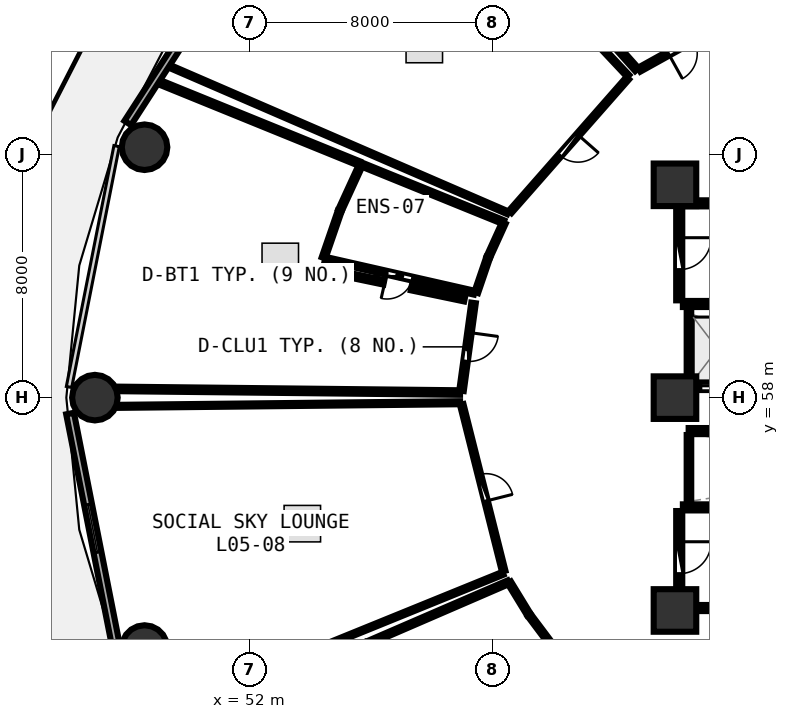
"""IFC4 building model, lengths in metres.
Left out: names, types, materials, properties, quantities, classifications, styles, units other than length and angle.
Written with IfcOpenShell. Run it as: python <this file> out.ifc"""

import sys

from ifc_helpers import new_model, si_unit, direction, frame, frame_2d, origin, origin_2d, place, context, subcontext, project, spatial, rectangle, circle, extrude, element, fill, save


model = new_model("IFC4")
c1 = context("Model", 3, precision=1e-05, world=origin(), true_north=direction((0.0, 1.0)))
c2 = subcontext(c1, "Body", "Model", "MODEL_VIEW")
j1 = project(units=[si_unit("LENGTHUNIT", "METRE"), si_unit("PLANEANGLEUNIT", "RADIAN")], contexts=[c1])
p1 = place(None, origin())
s1 = spatial("IfcSite", under=j1, at=p1, CompositionType="ELEMENT")
p2 = place(p1, origin())
s2 = spatial("IfcBuilding", under=s1, at=p2, CompositionType="ELEMENT")
p3 = place(p2, frame((0.0, 0.0, 22.5)))
s3 = spatial("IfcBuildingStorey", under=s2, at=p3, CompositionType="ELEMENT", Elevation=22.5)
for number, where, z_axis, x_axis in (
    (1, (66.0, 51.0, 0.0), (0.0, 0.0, 1.0), (1.0, 0.0, 0.0)),
    (2, (66.0, 65.0, 0.0), (0.0, 0.0, 1.0), (1.0, 0.0, 0.0)),
    (3, (66.0, 58.0, 0.0), (0.0, 0.0, 1.0), (1.0, 0.0, 0.0)),
):
    element("IfcColumn", number, at=place(p3, frame(where, z_axis=z_axis, x_axis=x_axis)), inside=s3, PredefinedType="PILASTER", context=c2, shape_type="SweptSolid", body=[
        extrude(rectangle(XDim=1.4, YDim=1.4, at=origin_2d()), origin(), (0.0, 0.0, 1.0), 3.75),
    ])
for number, where, z_axis, x_axis in (
    (4, (48.553, 66.236, 0.0), (0.0, 0.0, 1.0), (1.0, 0.0, 0.0)),
    (5, (46.92, 58.0, 0.0), (0.0, 0.0, 1.0), (1.0, 0.0, 0.0)),
    (6, (48.553, 49.764, 0.0), (0.0, 0.0, 1.0), (1.0, 0.0, 0.0)),
):
    element("IfcColumn", number, at=place(p3, frame(where, z_axis=z_axis, x_axis=x_axis)), inside=s3, PredefinedType="COLUMN", context=c2, shape_type="SweptSolid", body=[
        extrude(circle(Radius=0.75, at=origin_2d()), origin(), (0.0, 0.0, 1.0), 3.75),
    ])
p4 = place(p3, frame((52.311, 73.698, 0.0), z_axis=(0.0, 0.0, 1.0), x_axis=(-0.543005114258, -0.839729388488, 0.0)))
e7 = element("IfcWall", 7, at=p4, inside=s3, PredefinedType="SOLIDWALL", context=c2, shape_type="SweptSolid", body=[
    extrude(rectangle(XDim=7.938, YDim=0.26, at=frame_2d((3.969, 0.0))), origin(), (0.0, 0.0, 1.0), 3.475),
])
p5 = place(p4, frame((3.494, 0.0, 0.0)))
e8 = element("IfcOpeningElement", 8, at=p5, cuts=e7, PredefinedType="OPENING", context=c2, shape_type="SweptSolid", body=[
    extrude(rectangle(XDim=0.95, YDim=2.1, at=frame_2d((0.475, 1.05))), frame((0.0, 0.14, 0.0), z_axis=(0.0, -1.0, 0.0), x_axis=(1.0, 0.0, 0.0)), (0.0, 0.0, 1.0), 0.28),
])
p6 = place(p4, frame((1.914, 0.0, 0.85)))
e9 = element("IfcOpeningElement", 9, at=p6, cuts=e7, PredefinedType="OPENING", context=c2, shape_type="SweptSolid", body=[
    extrude(rectangle(XDim=1.2, YDim=1.45, at=frame_2d((0.6, 0.725))), frame((0.0, 0.14, 0.0), z_axis=(0.0, -1.0, 0.0), x_axis=(1.0, 0.0, 0.0)), (0.0, 0.0, 1.0), 0.28),
])
p7 = place(p3, frame((46.104, 57.477, 0.0), z_axis=(0.0, 0.0, 1.0), x_axis=(0.193726159581, -0.98105564322, 0.0)))
e10 = element("IfcWall", 10, at=p7, inside=s3, PredefinedType="SOLIDWALL", context=c2, shape_type="SweptSolid", body=[
    extrude(rectangle(XDim=7.703, YDim=0.26, at=frame_2d((3.851, 0.0))), origin(), (0.0, 0.0, 1.0), 3.475),
])
p8 = place(p7, frame((3.051, 0.0, 0.85)))
e11 = element("IfcOpeningElement", 11, at=p8, cuts=e10, PredefinedType="OPENING", context=c2, shape_type="SweptSolid", body=[
    extrude(rectangle(XDim=1.6, YDim=1.45, at=frame_2d((0.8, 0.725))), frame((0.0, 0.14, 0.0), z_axis=(0.0, -1.0, 0.0), x_axis=(1.0, 0.0, 0.0)), (0.0, 0.0, 1.0), 0.28),
])
for number, where, z_axis, x_axis in (
    (12, (66.26, 61.08, 0.0), (0.0, 0.0, 1.0), (1.0, 0.0, 0.0)),
    (13, (73.42, 64.39, 0.0), (0.0, 0.0, 1.0), (-1.0, 0.0, 0.0)),
):
    element("IfcWall", number, at=place(p3, frame(where, z_axis=z_axis, x_axis=x_axis)), inside=s3, PredefinedType="SHEAR", context=c2, shape_type="SweptSolid", body=[
        extrude(rectangle(XDim=7.16, YDim=0.2, at=frame_2d((3.58, 0.0))), origin(), (0.0, 0.0, 1.0), 3.49),
    ])
p9 = place(p3, frame((66.14, 64.27, 0.0), z_axis=(0.0, 0.0, 1.0), x_axis=(0.0, -1.0, 0.0)))
e14 = element("IfcWall", 14, at=p9, inside=s3, PredefinedType="SHEAR", context=c2, shape_type="SweptSolid", body=[
    extrude(rectangle(XDim=3.07, YDim=0.2, at=frame_2d((1.535, 0.0))), origin(), (0.0, 0.0, 1.0), 3.49),
])
p10 = place(p9, frame((1.01, 0.0, 0.0)))
e15 = element("IfcOpeningElement", 15, at=p10, cuts=e14, PredefinedType="OPENING", context=c2, shape_type="SweptSolid", body=[
    extrude(rectangle(XDim=1.05, YDim=2.1, at=frame_2d((0.525, 1.05))), frame((0.0, 0.11, 0.0), z_axis=(0.0, -1.0, 0.0), x_axis=(1.0, 0.0, 0.0)), (0.0, 0.0, 1.0), 0.22),
])
for number, where, z_axis, x_axis in (
    (16, (66.26, 51.08, 0.0), (0.0, 0.0, 1.0), (1.0, 0.0, 0.0)),
    (17, (73.42, 54.39, 0.0), (0.0, 0.0, 1.0), (-1.0, 0.0, 0.0)),
):
    element("IfcWall", number, at=place(p3, frame(where, z_axis=z_axis, x_axis=x_axis)), inside=s3, PredefinedType="SHEAR", context=c2, shape_type="SweptSolid", body=[
        extrude(rectangle(XDim=7.16, YDim=0.2, at=frame_2d((3.58, 0.0))), origin(), (0.0, 0.0, 1.0), 3.49),
    ])
p11 = place(p3, frame((66.14, 54.27, 0.0), z_axis=(0.0, 0.0, 1.0), x_axis=(0.0, -1.0, 0.0)))
e18 = element("IfcWall", 18, at=p11, inside=s3, PredefinedType="SHEAR", context=c2, shape_type="SweptSolid", body=[
    extrude(rectangle(XDim=3.07, YDim=0.2, at=frame_2d((1.535, 0.0))), origin(), (0.0, 0.0, 1.0), 3.49),
])
p12 = place(p11, frame((1.01, 0.0, 0.0)))
e19 = element("IfcOpeningElement", 19, at=p12, cuts=e18, PredefinedType="OPENING", context=c2, shape_type="SweptSolid", body=[
    extrude(rectangle(XDim=1.05, YDim=2.1, at=frame_2d((0.525, 1.05))), frame((0.0, 0.11, 0.0), z_axis=(0.0, -1.0, 0.0), x_axis=(1.0, 0.0, 0.0)), (0.0, 0.0, 1.0), 0.22),
])
p13 = place(p3, frame((66.45, 58.35, 0.0), z_axis=(0.0, 0.0, 1.0), x_axis=(1.0, 0.0, 0.0)))
e20 = element("IfcWall", 20, at=p13, inside=s3, PredefinedType="SOLIDWALL", context=c2, shape_type="SweptSolid", body=[
    extrude(rectangle(XDim=6.0, YDim=0.2, at=frame_2d((3.0, 0.0))), origin(), (0.0, 0.0, 1.0), 3.48),
])
p14 = place(p13, frame((0.4, 0.0, 0.0)))
e21 = element("IfcOpeningElement", 21, at=p14, cuts=e20, PredefinedType="OPENING", context=c2, shape_type="SweptSolid", body=[
    extrude(rectangle(XDim=1.1, YDim=2.1, at=frame_2d((0.55, 1.05))), frame((0.0, 0.11, 0.0), z_axis=(0.0, -1.0, 0.0), x_axis=(1.0, 0.0, 0.0)), (0.0, 0.0, 1.0), 0.22),
])
p15 = place(p13, frame((2.4, 0.0, 0.0)))
e22 = element("IfcOpeningElement", 22, at=p15, cuts=e20, PredefinedType="OPENING", context=c2, shape_type="SweptSolid", body=[
    extrude(rectangle(XDim=1.1, YDim=2.1, at=frame_2d((0.55, 1.05))), frame((0.0, 0.11, 0.0), z_axis=(0.0, -1.0, 0.0), x_axis=(1.0, 0.0, 0.0)), (0.0, 0.0, 1.0), 0.22),
])
p16 = place(p13, frame((4.4, 0.0, 0.0)))
e23 = element("IfcOpeningElement", 23, at=p16, cuts=e20, PredefinedType="OPENING", context=c2, shape_type="SweptSolid", body=[
    extrude(rectangle(XDim=1.1, YDim=2.1, at=frame_2d((0.55, 1.05))), frame((0.0, 0.11, 0.0), z_axis=(0.0, -1.0, 0.0), x_axis=(1.0, 0.0, 0.0)), (0.0, 0.0, 1.0), 0.22),
])
p17 = place(p3, frame((66.46, 58.48, 0.0), z_axis=(0.0, 0.0, 1.0), x_axis=(0.0, 1.0, 0.0)))
e24 = element("IfcWall", 24, at=p17, inside=s3, PredefinedType="PARTITIONING", context=c2, shape_type="SweptSolid", body=[
    extrude(rectangle(XDim=2.46, YDim=0.15, at=frame_2d((1.23, 0.0))), origin(), (0.0, 0.0, 1.0), 3.48),
])
p18 = place(p3, frame((66.45, 56.9, 0.0), z_axis=(0.0, 0.0, 1.0), x_axis=(1.0, 0.0, 0.0)))
e25 = element("IfcWall", 25, at=p18, inside=s3, PredefinedType="SOLIDWALL", context=c2, shape_type="SweptSolid", body=[
    extrude(rectangle(XDim=14.4, YDim=0.2, at=frame_2d((7.2, 0.0))), origin(), (0.0, 0.0, 1.0), 3.48),
])
p19 = place(p3, frame((66.46, 54.48, 0.0), z_axis=(0.0, 0.0, 1.0), x_axis=(0.0, 1.0, 0.0)))
e26 = element("IfcWall", 26, at=p19, inside=s3, PredefinedType="PARTITIONING", context=c2, shape_type="SweptSolid", body=[
    extrude(rectangle(XDim=2.29, YDim=0.15, at=frame_2d((1.145, 0.0))), origin(), (0.0, 0.0, 1.0), 3.48),
])
p20 = place(p3, frame((67.571, 70.313, 0.0), z_axis=(0.0, 0.0, 1.0), x_axis=(-0.874179278891, -0.48560332408, 0.0)))
e27 = element("IfcWall", 27, at=p20, inside=s3, PredefinedType="PARTITIONING", context=c2, shape_type="SweptSolid", body=[
    extrude(rectangle(XDim=3.14, YDim=0.15, at=frame_2d((1.57, 0.0))), origin(), (0.0, 0.0, 1.0), 3.48),
])
p21 = place(p20, frame((1.095, 0.0, 0.0)))
e28 = element("IfcOpeningElement", 28, at=p21, cuts=e27, PredefinedType="OPENING", context=c2, shape_type="SweptSolid", body=[
    extrude(rectangle(XDim=0.95, YDim=2.08, at=frame_2d((0.475, 1.04))), frame((0.0, 0.085, 0.0), z_axis=(0.0, -1.0, 0.0), x_axis=(1.0, 0.0, 0.0)), (0.0, 0.0, 1.0), 0.17),
])
p22 = place(p3, frame((64.446, 68.507, 0.0), z_axis=(0.0, 0.0, 1.0), x_axis=(-0.660323401664, -0.75098136143, 0.0)))
e29 = element("IfcWall", 29, at=p22, inside=s3, PredefinedType="PARTITIONING", context=c2, shape_type="SweptSolid", body=[
    extrude(rectangle(XDim=5.857, YDim=0.12, at=frame_2d((2.929, 0.0))), origin(), (0.0, 0.0, 1.0), 2.875),
])
p23 = place(p22, frame((2.479, 0.0, 0.0)))
e30 = element("IfcOpeningElement", 30, at=p23, cuts=e29, PredefinedType="OPENING", context=c2, shape_type="SweptSolid", body=[
    extrude(rectangle(XDim=0.9, YDim=2.08, at=frame_2d((0.45, 1.04))), frame((0.0, 0.07, 0.0), z_axis=(0.0, -1.0, 0.0), x_axis=(1.0, 0.0, 0.0)), (0.0, 0.0, 1.0), 0.14),
])
p24 = place(p3, frame((59.397, 61.452, 0.0), z_axis=(0.0, 0.0, 1.0), x_axis=(-0.975187669184, 0.221379786503, 0.0)))
e31 = element("IfcWall", 31, at=p24, inside=s3, PredefinedType="PLUMBINGWALL", context=c2, shape_type="SweptSolid", body=[
    extrude(rectangle(XDim=5.029, YDim=0.13, at=frame_2d((2.514, 0.0))), origin(), (0.0, 0.0, 1.0), 3.175),
])
p25 = place(p24, frame((2.084, 0.0, 0.0)))
e32 = element("IfcOpeningElement", 32, at=p25, cuts=e31, PredefinedType="OPENING", context=c2, shape_type="SweptSolid", body=[
    extrude(rectangle(XDim=0.86, YDim=2.05, at=frame_2d((0.43, 1.025))), frame((0.0, 0.075, 0.0), z_axis=(0.0, -1.0, 0.0), x_axis=(1.0, 0.0, 0.0)), (0.0, 0.0, 1.0), 0.15),
])
p26 = place(p3, frame((59.375, 61.115, 0.0), z_axis=(0.0, 0.0, 1.0), x_axis=(-0.135838186105, -0.990731036758, 0.0)))
e33 = element("IfcWall", 33, at=p26, inside=s3, PredefinedType="PARTITIONING", context=c2, shape_type="SweptSolid", body=[
    extrude(rectangle(XDim=2.915, YDim=0.15, at=frame_2d((1.458, 0.0))), origin(), (0.0, 0.0, 1.0), 3.48),
])
p27 = place(p26, frame((0.983, 0.0, 0.0)))
e34 = element("IfcOpeningElement", 34, at=p27, cuts=e33, PredefinedType="OPENING", context=c2, shape_type="SweptSolid", body=[
    extrude(rectangle(XDim=0.95, YDim=2.08, at=frame_2d((0.475, 1.04))), frame((0.0, 0.085, 0.0), z_axis=(0.0, -1.0, 0.0), x_axis=(1.0, 0.0, 0.0)), (0.0, 0.0, 1.0), 0.17),
])
p28 = place(p3, frame((58.986, 57.775, 0.0), z_axis=(0.0, 0.0, 1.0), x_axis=(0.244192294026, -0.969726829338, 0.0)))
e35 = element("IfcWall", 35, at=p28, inside=s3, PredefinedType="PARTITIONING", context=c2, shape_type="SweptSolid", body=[
    extrude(rectangle(XDim=5.651, YDim=0.12, at=frame_2d((2.825, 0.0))), origin(), (0.0, 0.0, 1.0), 3.48),
])
p29 = place(p28, frame((2.375, 0.0, 0.0)))
e36 = element("IfcOpeningElement", 36, at=p29, cuts=e35, PredefinedType="OPENING", context=c2, shape_type="SweptSolid", body=[
    extrude(rectangle(XDim=0.9, YDim=2.08, at=frame_2d((0.45, 1.04))), frame((0.0, 0.07, 0.0), z_axis=(0.0, -1.0, 0.0), x_axis=(1.0, 0.0, 0.0)), (0.0, 0.0, 1.0), 0.14),
])
p30 = place(p3, frame((64.746, 68.789, 0.0), z_axis=(0.0, 0.0, 1.0), x_axis=(-0.66580890104, 0.746122313897, 0.0)))
e37 = element("IfcWall", 37, at=p30, inside=s3, PredefinedType="PARTITIONING", context=c2, shape_type="SweptSolid", body=[
    extrude(rectangle(XDim=11.399, YDim=0.15, at=frame_2d((5.7, 0.0))), origin(), (0.0, 0.0, 1.0), 2.875),
])
p31 = place(p3, frame((60.502, 64.079, 0.0), z_axis=(0.0, 0.0, 1.0), x_axis=(-0.917695041134, 0.397285554077, 0.0)))
e38 = element("IfcWall", 38, at=p31, inside=s3, PredefinedType="PARTITIONING", context=c2, shape_type="SweptSolid", body=[
    extrude(rectangle(XDim=12.07, YDim=0.1, at=frame_2d((6.035, 0.0))), origin(), (0.0, 0.0, 1.0), 2.875),
])
p32 = place(p3, frame((56.632, 76.922, 0.0), z_axis=(0.0, 0.0, 1.0), x_axis=(0.684261294523, -0.729236916796, 0.0)))
e39 = element("IfcWall", 39, at=p32, inside=s3, PredefinedType="PARTITIONING", context=c2, shape_type="SweptSolid", body=[
    extrude(rectangle(XDim=11.438, YDim=0.1, at=frame_2d((5.719, 0.0))), origin(), (0.0, 0.0, 1.0), 2.875),
])
p33 = place(p3, frame((60.372, 63.745, 0.0), z_axis=(0.0, 0.0, 1.0), x_axis=(-0.4138937247, -0.910325208183, 0.0)))
e40 = element("IfcWall", 40, at=p33, inside=s3, PredefinedType="PLUMBINGWALL", context=c2, shape_type="SweptSolid", body=[
    extrude(rectangle(XDim=1.216, YDim=0.13, at=frame_2d((0.608, 0.0))), origin(), (0.0, 0.0, 1.0), 3.48),
])
p34 = place(p3, frame((59.854, 62.601, 0.0), z_axis=(0.0, 0.0, 1.0), x_axis=(-0.323735286305, -0.946147696928, 0.0)))
e41 = element("IfcWall", 41, at=p34, inside=s3, PredefinedType="PLUMBINGWALL", context=c2, shape_type="SweptSolid", body=[
    extrude(rectangle(XDim=1.208, YDim=0.13, at=frame_2d((0.604, 0.0))), origin(), (0.0, 0.0, 1.0), 3.48),
])
p35 = place(p3, frame((54.441, 62.598, 0.0), z_axis=(0.0, 0.0, 1.0), x_axis=(0.326356647952, 0.945246707657, 0.0)))
e42 = element("IfcWall", 42, at=p35, inside=s3, PredefinedType="PLUMBINGWALL", context=c2, shape_type="SweptSolid", body=[
    extrude(rectangle(XDim=1.624, YDim=0.13, at=frame_2d((0.812, 0.0))), origin(), (0.0, 0.0, 1.0), 3.48),
])
p36 = place(p3, frame((54.986, 64.17, 0.0), z_axis=(0.0, 0.0, 1.0), x_axis=(0.41762687648, 0.908618617486, 0.0)))
e43 = element("IfcWall", 43, at=p36, inside=s3, PredefinedType="PLUMBINGWALL", context=c2, shape_type="SweptSolid", body=[
    extrude(rectangle(XDim=1.634, YDim=0.13, at=frame_2d((0.817, 0.0))), origin(), (0.0, 0.0, 1.0), 2.875),
])
p37 = place(p3, frame((55.696, 65.666, 0.0), z_axis=(0.0, 0.0, 1.0), x_axis=(0.926504606816, -0.376283421835, 0.0)))
e44 = element("IfcWall", 44, at=p37, inside=s3, PredefinedType="PLUMBINGWALL", context=c2, shape_type="SweptSolid", body=[
    extrude(rectangle(XDim=5.036, YDim=0.13, at=frame_2d((2.518, 0.0))), origin(), (0.0, 0.0, 1.0), 2.875),
])
p38 = place(p3, frame((58.931, 58.167, 0.0), z_axis=(0.0, 0.0, 1.0), x_axis=(-0.999943877154, 0.010594458135, 0.0)))
e45 = element("IfcWall", 45, at=p38, inside=s3, PredefinedType="PARTITIONING", context=c2, shape_type="SweptSolid", body=[
    extrude(rectangle(XDim=11.292, YDim=0.15, at=frame_2d((5.646, 0.0))), origin(), (0.0, 0.0, 1.0), 2.875),
])
p39 = place(p3, frame((49.135, 68.336, 0.0), z_axis=(0.0, 0.0, 1.0), x_axis=(0.926325178802, -0.376724917038, 0.0)))
e46 = element("IfcWall", 46, at=p39, inside=s3, PredefinedType="PARTITIONING", context=c2, shape_type="SweptSolid", body=[
    extrude(rectangle(XDim=6.983, YDim=0.15, at=frame_2d((3.492, 0.0))), origin(), (0.0, 0.0, 1.0), 2.875),
])
p40 = place(p3, frame((54.337, 62.227, 0.0), z_axis=(0.0, 0.0, 1.0), x_axis=(0.978922282622, -0.204233113343, 0.0)))
e47 = element("IfcWall", 47, at=p40, inside=s3, PredefinedType="PARTITIONING", context=c2, shape_type="SweptSolid", body=[
    extrude(rectangle(XDim=2.133, YDim=0.15, at=frame_2d((1.066, 0.0))), origin(), (0.0, 0.0, 1.0), 3.175),
])
p41 = place(p3, frame((57.325, 61.603, 0.0), z_axis=(0.0, 0.0, 1.0), x_axis=(0.978929424395, -0.204198878681, 0.0)))
e48 = element("IfcWall", 48, at=p41, inside=s3, PredefinedType="PARTITIONING", context=c2, shape_type="SweptSolid", body=[
    extrude(rectangle(XDim=1.793, YDim=0.15, at=frame_2d((0.897, 0.0))), origin(), (0.0, 0.0, 1.0), 3.235),
])
p42 = place(p3, frame((60.343, 52.222, 0.0), z_axis=(0.0, 0.0, 1.0), x_axis=(-0.926333713065, -0.376703931542, 0.0)))
e49 = element("IfcWall", 49, at=p42, inside=s3, PredefinedType="PARTITIONING", context=c2, shape_type="SweptSolid", body=[
    extrude(rectangle(XDim=12.099, YDim=0.1, at=frame_2d((6.05, 0.0))), origin(), (0.0, 0.0, 1.0), 2.875),
])
p43 = place(p3, frame((47.64, 57.713, 0.0), z_axis=(0.0, 0.0, 1.0), x_axis=(0.999943877154, 0.010594458135, 0.0)))
e50 = element("IfcWall", 50, at=p43, inside=s3, PredefinedType="PARTITIONING", context=c2, shape_type="SweptSolid", body=[
    extrude(rectangle(XDim=11.292, YDim=0.1, at=frame_2d((5.646, 0.0))), origin(), (0.0, 0.0, 1.0), 2.875),
])
p44 = place(p3, frame((60.549, 51.92, 0.0), z_axis=(0.0, 0.0, 1.0), x_axis=(0.52146609248, -0.853272004928, 0.0)))
e51 = element("IfcWall", 51, at=p44, inside=s3, PredefinedType="PLUMBINGWALL", context=c2, shape_type="SweptSolid", body=[
    extrude(rectangle(XDim=1.228, YDim=0.13, at=frame_2d((0.614, 0.0))), origin(), (0.0, 0.0, 1.0), 3.48),
])
p45 = place(p3, frame((61.212, 50.839, 0.0), z_axis=(0.0, 0.0, 1.0), x_axis=(0.600347056143, -0.79973959023, 0.0)))
e52 = element("IfcWall", 52, at=p45, inside=s3, PredefinedType="PLUMBINGWALL", context=c2, shape_type="SweptSolid", body=[
    extrude(rectangle(XDim=1.238, YDim=0.13, at=frame_2d((0.619, 0.0))), origin(), (0.0, 0.0, 1.0), 2.875),
])
p46 = place(p3, frame((55.91, 49.935, 0.0), z_axis=(0.0, 0.0, 1.0), x_axis=(0.917797204715, 0.397049481826, 0.0)))
e53 = element("IfcWall", 53, at=p46, inside=s3, PredefinedType="PLUMBINGWALL", context=c2, shape_type="SweptSolid", body=[
    extrude(rectangle(XDim=5.023, YDim=0.13, at=frame_2d((2.511, 0.0))), origin(), (0.0, 0.0, 1.0), 2.875),
])
p47 = place(p8, origin())
e54 = element("IfcWindow", 54, at=p47, inside=s3, PartitioningType="SINGLE_PANEL", PredefinedType="WINDOW", context=c2, shape_type="SweptSolid", body=[
    extrude(rectangle(XDim=1.6, YDim=1.45, at=frame_2d((0.8, 0.725))), frame((0.0, 0.03, 0.0), z_axis=(0.0, -1.0, 0.0), x_axis=(1.0, 0.0, 0.0)), (0.0, 0.0, 1.0), 0.06),
])
fill(e11, e54)
p48 = place(p10, origin())
e55 = element("IfcDoor", 55, at=p48, inside=s3, OperationType="SINGLE_SWING_LEFT", PredefinedType="DOOR", context=c2, shape_type="SweptSolid", body=[
    extrude(rectangle(XDim=1.05, YDim=2.1, at=frame_2d((0.525, 1.05))), frame((0.0, 0.025, 0.0), z_axis=(0.0, -1.0, 0.0), x_axis=(1.0, 0.0, 0.0)), (0.0, 0.0, 1.0), 0.05),
])
fill(e15, e55)
p49 = place(p12, origin())
e56 = element("IfcDoor", 56, at=p49, inside=s3, OperationType="SINGLE_SWING_LEFT", PredefinedType="DOOR", context=c2, shape_type="SweptSolid", body=[
    extrude(rectangle(XDim=1.05, YDim=2.1, at=frame_2d((0.525, 1.05))), frame((0.0, 0.025, 0.0), z_axis=(0.0, -1.0, 0.0), x_axis=(1.0, 0.0, 0.0)), (0.0, 0.0, 1.0), 0.05),
])
fill(e19, e56)
p50 = place(p14, origin())
e57 = element("IfcDoor", 57, at=p50, inside=s3, OperationType="DOUBLE_DOOR_SLIDING", PredefinedType="DOOR", context=c2, shape_type="SweptSolid", body=[
    extrude(rectangle(XDim=1.1, YDim=2.1, at=frame_2d((0.55, 1.05))), frame((0.0, 0.025, 0.0), z_axis=(0.0, -1.0, 0.0), x_axis=(1.0, 0.0, 0.0)), (0.0, 0.0, 1.0), 0.05),
])
fill(e21, e57)
p51 = place(p21, origin())
e58 = element("IfcDoor", 58, at=p51, inside=s3, OperationType="SINGLE_SWING_RIGHT", PredefinedType="DOOR", context=c2, shape_type="SweptSolid", body=[
    extrude(rectangle(XDim=0.95, YDim=2.08, at=frame_2d((0.475, 1.04))), frame((0.0, 0.025, 0.0), z_axis=(0.0, -1.0, 0.0), x_axis=(1.0, 0.0, 0.0)), (0.0, 0.0, 1.0), 0.05),
])
fill(e28, e58)
p52 = place(p23, origin())
e59 = element("IfcDoor", 59, at=p52, inside=s3, OperationType="SINGLE_SWING_LEFT", PredefinedType="DOOR", context=c2, shape_type="SweptSolid", body=[
    extrude(rectangle(XDim=0.9, YDim=2.08, at=frame_2d((0.45, 1.04))), frame((0.0, 0.025, 0.0), z_axis=(0.0, -1.0, 0.0), x_axis=(1.0, 0.0, 0.0)), (0.0, 0.0, 1.0), 0.05),
])
fill(e30, e59)
p53 = place(p25, origin())
e60 = element("IfcDoor", 60, at=p53, inside=s3, OperationType="SINGLE_SWING_RIGHT", PredefinedType="DOOR", context=c2, shape_type="SweptSolid", body=[
    extrude(rectangle(XDim=0.86, YDim=2.05, at=frame_2d((0.43, 1.025))), frame((0.0, 0.025, 0.0), z_axis=(0.0, -1.0, 0.0), x_axis=(1.0, 0.0, 0.0)), (0.0, 0.0, 1.0), 0.05),
])
fill(e32, e60)
p54 = place(p27, origin())
e61 = element("IfcDoor", 61, at=p54, inside=s3, OperationType="SINGLE_SWING_LEFT", PredefinedType="DOOR", context=c2, shape_type="SweptSolid", body=[
    extrude(rectangle(XDim=0.95, YDim=2.08, at=frame_2d((0.475, 1.04))), frame((0.0, 0.025, 0.0), z_axis=(0.0, -1.0, 0.0), x_axis=(1.0, 0.0, 0.0)), (0.0, 0.0, 1.0), 0.05),
])
fill(e34, e61)
p55 = place(p29, origin())
e62 = element("IfcDoor", 62, at=p55, inside=s3, OperationType="SINGLE_SWING_RIGHT", PredefinedType="DOOR", context=c2, shape_type="SweptSolid", body=[
    extrude(rectangle(XDim=0.9, YDim=2.08, at=frame_2d((0.45, 1.04))), frame((0.0, 0.025, 0.0), z_axis=(0.0, -1.0, 0.0), x_axis=(1.0, 0.0, 0.0)), (0.0, 0.0, 1.0), 0.05),
])
fill(e36, e62)
save(model, sys.argv[1])
